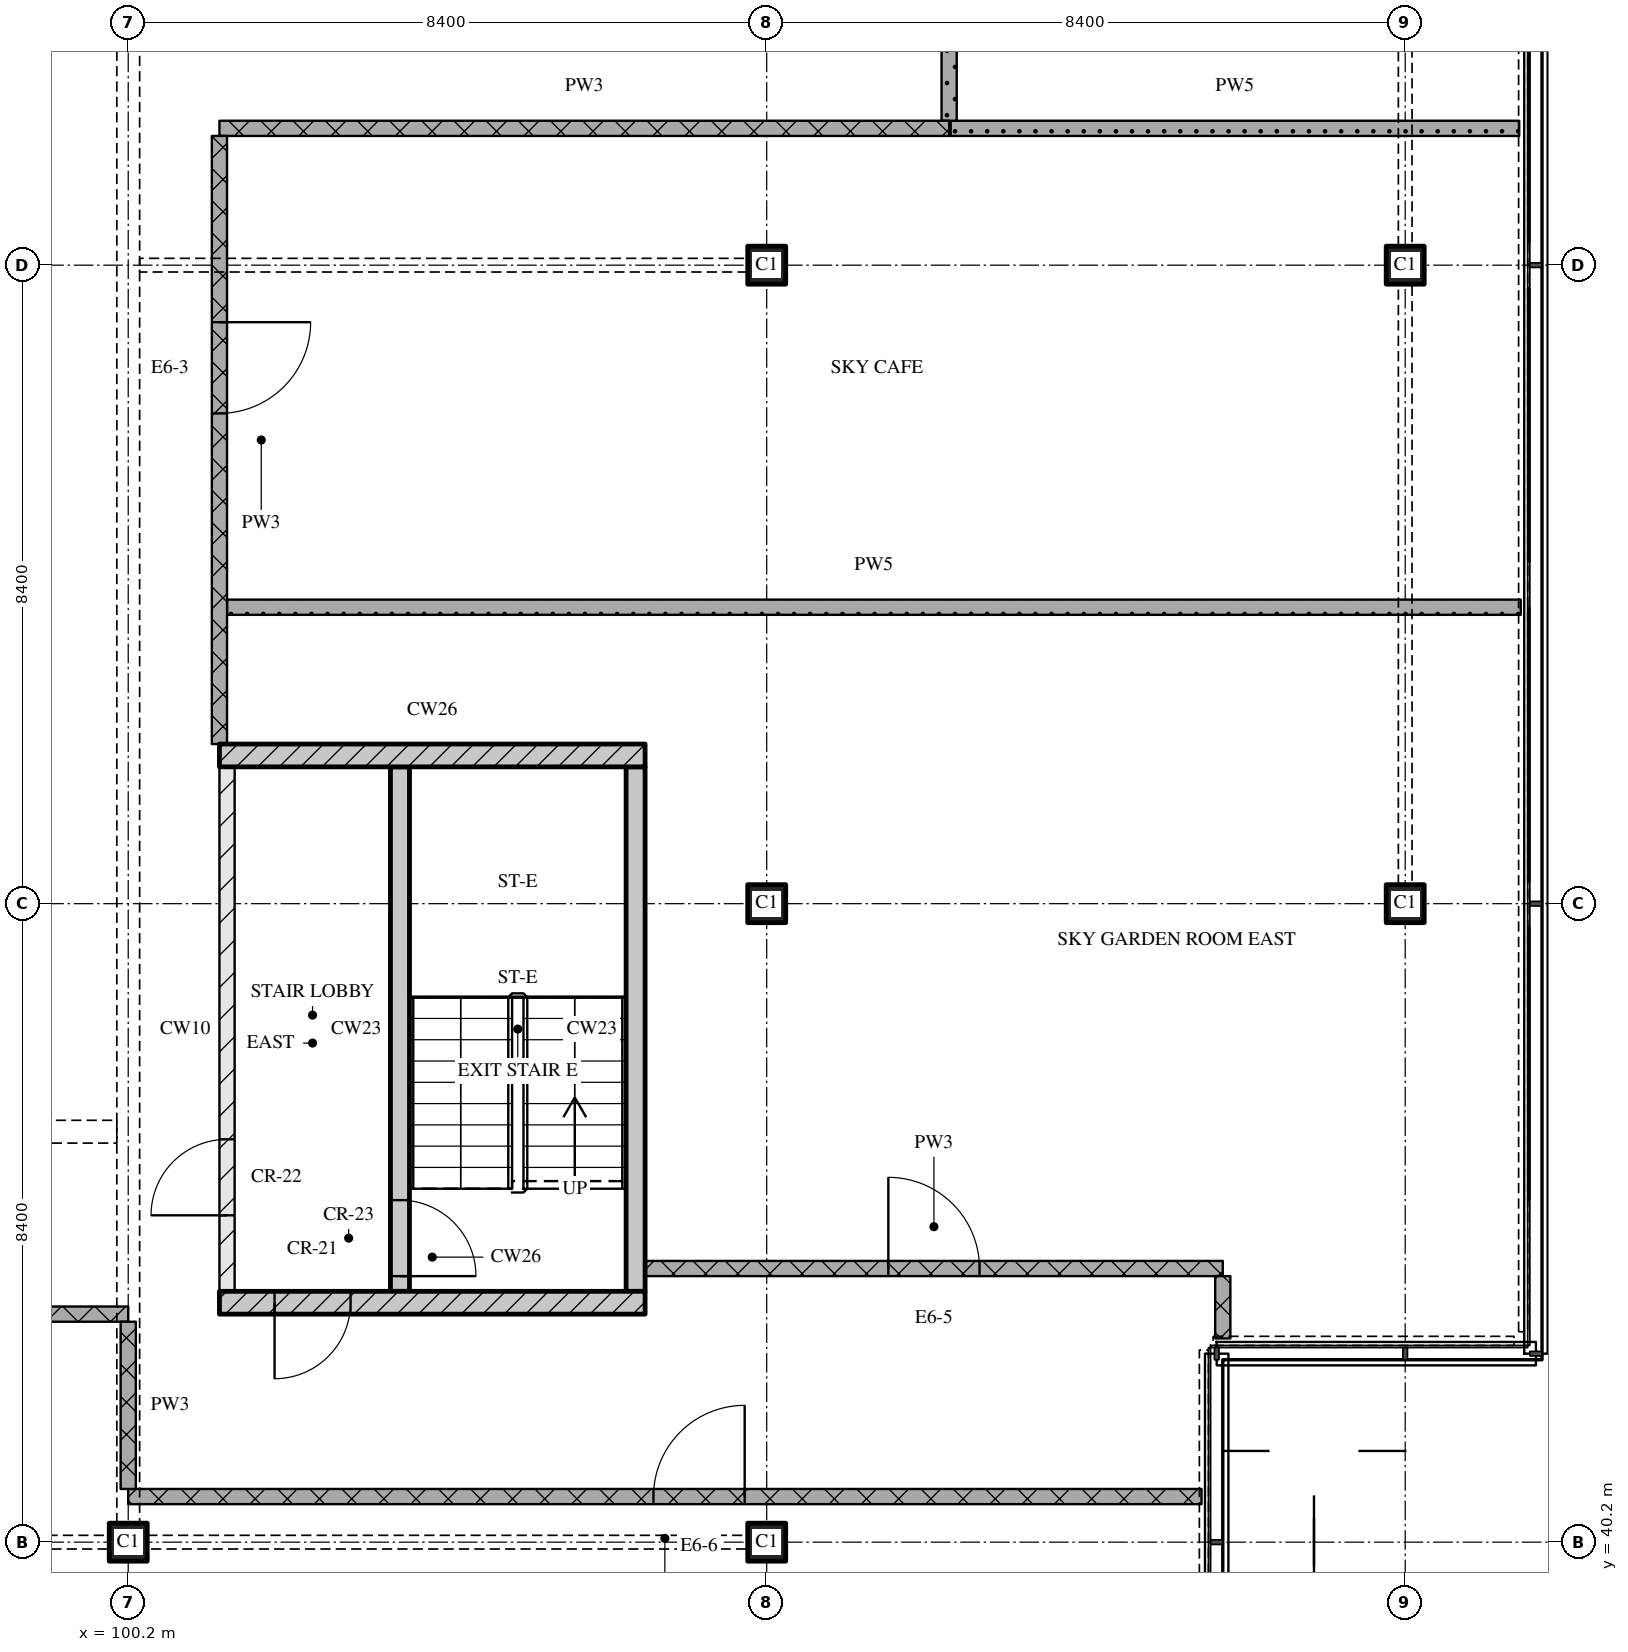
"""IFC4 building model, lengths in metres.
Left out: names, types, materials, properties, quantities, classifications, styles, units other than length and angle.
Written with IfcOpenShell. Run it as: python <this file> out.ifc"""

import sys

from ifc_helpers import new_model, si_unit, direction, frame, frame_2d, origin, origin_2d, place, context, subcontext, project, spatial, rectangle, extrude, element, fill, save


model = new_model("IFC4")
c1 = context("Model", 3, precision=1e-05, world=origin(), true_north=direction((0.0, 1.0)))
c2 = subcontext(c1, "Body", "Model", "MODEL_VIEW")
j1 = project(units=[si_unit("LENGTHUNIT", "METRE"), si_unit("PLANEANGLEUNIT", "RADIAN")], contexts=[c1])
p1 = place(None, origin())
s1 = spatial("IfcSite", under=j1, at=p1, CompositionType="ELEMENT")
p2 = place(p1, origin())
s2 = spatial("IfcBuilding", under=s1, at=p2, CompositionType="ELEMENT")
p3 = place(p2, frame((0.0, 0.0, 299.55)))
s3 = spatial("IfcBuildingStorey", under=s2, at=p3, CompositionType="ELEMENT", Elevation=299.55)
for number, where, z_axis, x_axis in (
    (1, (100.2, 40.2, 0.0), (0.0, 0.0, 1.0), (1.0, 0.0, 0.0)),
    (2, (108.6, 40.2, 0.0), (0.0, 0.0, 1.0), (1.0, 0.0, 0.0)),
    (3, (108.6, 48.6, 0.0), (0.0, 0.0, 1.0), (1.0, 0.0, 0.0)),
    (4, (108.6, 57.0, 0.0), (0.0, 0.0, 1.0), (1.0, 0.0, 0.0)),
    (5, (117.0, 48.6, 0.0), (0.0, 0.0, 1.0), (1.0, 0.0, 0.0)),
    (6, (117.0, 57.0, 0.0), (0.0, 0.0, 1.0), (1.0, 0.0, 0.0)),
):
    element("IfcColumn", number, at=place(p3, frame(where, z_axis=z_axis, x_axis=x_axis)), inside=s3, PredefinedType="COLUMN", context=c2, shape_type="SweptSolid", body=[
        extrude(rectangle(XDim=0.5, YDim=0.5, at=origin_2d()), origin(), (0.0, 0.0, 1.0), 3.6),
    ])
p4 = place(p3, frame((101.4, 43.35, 0.0), z_axis=(0.0, 0.0, 1.0), x_axis=(1.0, 0.0, 0.0)))
e7 = element("IfcWall", 7, at=p4, inside=s3, PredefinedType="SOLIDWALL", context=c2, shape_type="SweptSolid", body=[
    extrude(rectangle(XDim=5.6, YDim=0.3, at=frame_2d((2.8, 0.0))), origin(), (0.0, 0.0, 1.0), 3.32),
])
p5 = place(p4, frame((0.725, 0.0, 0.0)))
e8 = element("IfcOpeningElement", 8, at=p5, cuts=e7, PredefinedType="OPENING", context=c2, shape_type="SweptSolid", body=[
    extrude(rectangle(XDim=1.0, YDim=2.1, at=frame_2d((0.5, 1.05))), frame((0.0, 0.16, 0.0), z_axis=(0.0, -1.0, 0.0), x_axis=(1.0, 0.0, 0.0)), (0.0, 0.0, 1.0), 0.32),
])
p6 = place(p3, frame((101.5, 43.5, 0.0), z_axis=(0.0, 0.0, 1.0), x_axis=(0.0, 1.0, 0.0)))
e9 = element("IfcWall", 9, at=p6, inside=s3, PredefinedType="PARTITIONING", context=c2, shape_type="SweptSolid", body=[
    extrude(rectangle(XDim=6.9, YDim=0.2, at=frame_2d((3.45, 0.0))), origin(), (0.0, 0.0, 1.0), 3.32),
])
p7 = place(p6, frame((1.0, 0.0, 0.0)))
e10 = element("IfcOpeningElement", 10, at=p7, cuts=e9, PredefinedType="OPENING", context=c2, shape_type="SweptSolid", body=[
    extrude(rectangle(XDim=1.0, YDim=2.1, at=frame_2d((0.5, 1.05))), frame((0.0, 0.11, 0.0), z_axis=(0.0, -1.0, 0.0), x_axis=(1.0, 0.0, 0.0)), (0.0, 0.0, 1.0), 0.22),
])
p8 = place(p3, frame((103.775, 43.5, 0.0), z_axis=(0.0, 0.0, 1.0), x_axis=(0.0, 1.0, 0.0)))
e11 = element("IfcWall", 11, at=p8, inside=s3, PredefinedType="SOLIDWALL", context=c2, shape_type="SweptSolid", body=[
    extrude(rectangle(XDim=6.9, YDim=0.25, at=frame_2d((3.45, 0.0))), origin(), (0.0, 0.0, 1.0), 3.32),
])
p9 = place(p8, frame((0.2, 0.0, 0.0)))
e12 = element("IfcOpeningElement", 12, at=p9, cuts=e11, PredefinedType="OPENING", context=c2, shape_type="SweptSolid", body=[
    extrude(rectangle(XDim=1.0, YDim=2.1, at=frame_2d((0.5, 1.05))), frame((0.0, 0.135, 0.0), z_axis=(0.0, -1.0, 0.0), x_axis=(1.0, 0.0, 0.0)), (0.0, 0.0, 1.0), 0.27),
])
p10 = place(p3, frame((106.875, 43.5, 0.0), z_axis=(0.0, 0.0, 1.0), x_axis=(0.0, 1.0, 0.0)))
e13 = element("IfcWall", 13, at=p10, inside=s3, PredefinedType="SOLIDWALL", context=c2, shape_type="SweptSolid", body=[
    extrude(rectangle(XDim=6.9, YDim=0.25, at=frame_2d((3.45, 0.0))), origin(), (0.0, 0.0, 1.0), 3.32),
])
p11 = place(p3, frame((101.4, 50.55, 0.0), z_axis=(0.0, 0.0, 1.0), x_axis=(1.0, 0.0, 0.0)))
e14 = element("IfcWall", 14, at=p11, inside=s3, PredefinedType="SOLIDWALL", context=c2, shape_type="SweptSolid", body=[
    extrude(rectangle(XDim=5.6, YDim=0.3, at=frame_2d((2.8, 0.0))), origin(), (0.0, 0.0, 1.0), 3.32),
])
p12 = place(p3, frame((114.32, 40.8, 0.0), z_axis=(0.0, 0.0, 1.0), x_axis=(-1.0, 0.0, 0.0)))
e15 = element("IfcWall", 15, at=p12, inside=s3, PredefinedType="PARTITIONING", context=c2, shape_type="SweptSolid", body=[
    extrude(rectangle(XDim=14.12, YDim=0.2, at=frame_2d((7.06, 0.0))), origin(), (0.0, 0.0, 1.0), 3.32),
])
p13 = place(p12, frame((6.01, 0.0, 0.0)))
e16 = element("IfcOpeningElement", 16, at=p13, cuts=e15, PredefinedType="OPENING", context=c2, shape_type="SweptSolid", body=[
    extrude(rectangle(XDim=1.2, YDim=2.1, at=frame_2d((0.6, 1.05))), frame((0.0, 0.11, 0.0), z_axis=(0.0, -1.0, 0.0), x_axis=(1.0, 0.0, 0.0)), (0.0, 0.0, 1.0), 0.22),
])
p14 = place(p3, frame((100.2, 43.2, 0.0), z_axis=(0.0, 0.0, 1.0), x_axis=(-1.0, 0.0, 0.0)))
e17 = element("IfcWall", 17, at=p14, inside=s3, PredefinedType="PARTITIONING", context=c2, shape_type="SweptSolid", body=[
    extrude(rectangle(XDim=25.2, YDim=0.2, at=frame_2d((12.6, 0.0))), origin(), (0.0, 0.0, 1.0), 3.32),
])
p15 = place(p14, frame((12.0, 0.0, 0.0)))
e18 = element("IfcOpeningElement", 18, at=p15, cuts=e17, PredefinedType="OPENING", context=c2, shape_type="SweptSolid", body=[
    extrude(rectangle(XDim=1.2, YDim=2.1, at=frame_2d((0.6, 1.05))), frame((0.0, 0.11, 0.0), z_axis=(0.0, -1.0, 0.0), x_axis=(1.0, 0.0, 0.0)), (0.0, 0.0, 1.0), 0.22),
])
p16 = place(p3, frame((107.0, 43.8, 0.0), z_axis=(0.0, 0.0, 1.0), x_axis=(1.0, 0.0, 0.0)))
e19 = element("IfcWall", 19, at=p16, inside=s3, PredefinedType="PARTITIONING", context=c2, shape_type="SweptSolid", body=[
    extrude(rectangle(XDim=7.6, YDim=0.2, at=frame_2d((3.8, 0.0))), origin(), (0.0, 0.0, 1.0), 3.32),
])
p17 = place(p16, frame((3.2, 0.0, 0.0)))
e20 = element("IfcOpeningElement", 20, at=p17, cuts=e19, PredefinedType="OPENING", context=c2, shape_type="SweptSolid", body=[
    extrude(rectangle(XDim=1.2, YDim=2.1, at=frame_2d((0.6, 1.05))), frame((0.0, 0.11, 0.0), z_axis=(0.0, -1.0, 0.0), x_axis=(1.0, 0.0, 0.0)), (0.0, 0.0, 1.0), 0.22),
])
p18 = place(p3, frame((101.5, 52.5, 0.0), z_axis=(0.0, 0.0, 1.0), x_axis=(1.0, 0.0, 0.0)))
e21 = element("IfcWall", 21, at=p18, inside=s3, PredefinedType="PARTITIONING", context=c2, shape_type="SweptSolid", body=[
    extrude(rectangle(XDim=17.02, YDim=0.2, at=frame_2d((8.51, 0.0))), origin(), (0.0, 0.0, 1.0), 3.32),
])
p19 = place(p3, frame((101.4, 58.8, 0.0), z_axis=(0.0, 0.0, 1.0), x_axis=(1.0, 0.0, 0.0)))
e22 = element("IfcWall", 22, at=p19, inside=s3, PredefinedType="PARTITIONING", context=c2, shape_type="SweptSolid", body=[
    extrude(rectangle(XDim=9.6, YDim=0.2, at=frame_2d((4.8, 0.0))), origin(), (0.0, 0.0, 1.0), 3.32),
])
p20 = place(p3, frame((111.02, 58.8, 0.0), z_axis=(0.0, 0.0, 1.0), x_axis=(1.0, 0.0, 0.0)))
e23 = element("IfcWall", 23, at=p20, inside=s3, PredefinedType="PARTITIONING", context=c2, shape_type="SweptSolid", body=[
    extrude(rectangle(XDim=7.48, YDim=0.2, at=frame_2d((3.74, 0.0))), origin(), (0.0, 0.0, 1.0), 3.32),
])
p21 = place(p3, frame((100.2, 43.1, 0.0), z_axis=(0.0, 0.0, 1.0), x_axis=(0.0, -1.0, 0.0)))
e24 = element("IfcWall", 24, at=p21, inside=s3, PredefinedType="PARTITIONING", context=c2, shape_type="SweptSolid", body=[
    extrude(rectangle(XDim=2.2, YDim=0.2, at=frame_2d((1.1, 0.0))), origin(), (0.0, 0.0, 1.0), 2.53),
])
p22 = place(p3, frame((101.4, 58.7, 0.0), z_axis=(0.0, 0.0, 1.0), x_axis=(0.0, -1.0, 0.0)))
e25 = element("IfcWall", 25, at=p22, inside=s3, PredefinedType="PARTITIONING", context=c2, shape_type="SweptSolid", body=[
    extrude(rectangle(XDim=8.0, YDim=0.2, at=frame_2d((4.0, 0.0))), origin(), (0.0, 0.0, 1.0), 3.32),
])
p23 = place(p22, frame((2.45, 0.0, 0.0)))
e26 = element("IfcOpeningElement", 26, at=p23, cuts=e25, PredefinedType="OPENING", context=c2, shape_type="SweptSolid", body=[
    extrude(rectangle(XDim=1.2, YDim=2.1, at=frame_2d((0.6, 1.05))), frame((0.0, 0.11, 0.0), z_axis=(0.0, -1.0, 0.0), x_axis=(1.0, 0.0, 0.0)), (0.0, 0.0, 1.0), 0.22),
])
p24 = place(p3, frame((111.0, 61.1, 0.0), z_axis=(0.0, 0.0, 1.0), x_axis=(0.0, -1.0, 0.0)))
e27 = element("IfcWall", 27, at=p24, inside=s3, PredefinedType="PARTITIONING", context=c2, shape_type="SweptSolid", body=[
    extrude(rectangle(XDim=2.2, YDim=0.2, at=frame_2d((1.1, 0.0))), origin(), (0.0, 0.0, 1.0), 3.32),
])
p25 = place(p3, frame((114.6, 43.7, 0.0), z_axis=(0.0, 0.0, 1.0), x_axis=(0.0, -1.0, 0.0)))
e28 = element("IfcWall", 28, at=p25, inside=s3, PredefinedType="PARTITIONING", context=c2, shape_type="SweptSolid", body=[
    extrude(rectangle(XDim=0.82, YDim=0.2, at=frame_2d((0.41, 0.0))), origin(), (0.0, 0.0, 1.0), 3.32),
])
p26 = place(p5, origin())
e29 = element("IfcDoor", 29, at=p26, inside=s3, OperationType="SINGLE_SWING_RIGHT", PredefinedType="DOOR", context=c2, shape_type="SweptSolid", body=[
    extrude(rectangle(XDim=1.0, YDim=2.1, at=frame_2d((0.5, 1.05))), frame((0.0, 0.025, 0.0), z_axis=(0.0, -1.0, 0.0), x_axis=(1.0, 0.0, 0.0)), (0.0, 0.0, 1.0), 0.05),
])
fill(e8, e29)
p27 = place(p9, origin())
e30 = element("IfcDoor", 30, at=p27, inside=s3, OperationType="SINGLE_SWING_RIGHT", PredefinedType="DOOR", context=c2, shape_type="SweptSolid", body=[
    extrude(rectangle(XDim=1.0, YDim=2.1, at=frame_2d((0.5, 1.05))), frame((0.0, 0.025, 0.0), z_axis=(0.0, -1.0, 0.0), x_axis=(1.0, 0.0, 0.0)), (0.0, 0.0, 1.0), 0.05),
])
fill(e12, e30)
p28 = place(p7, origin())
e31 = element("IfcDoor", 31, at=p28, inside=s3, OperationType="SINGLE_SWING_LEFT", PredefinedType="DOOR", context=c2, shape_type="SweptSolid", body=[
    extrude(rectangle(XDim=1.0, YDim=2.1, at=frame_2d((0.5, 1.05))), frame((0.0, 0.025, 0.0), z_axis=(0.0, -1.0, 0.0), x_axis=(1.0, 0.0, 0.0)), (0.0, 0.0, 1.0), 0.05),
])
fill(e10, e31)
p29 = place(p13, origin())
e32 = element("IfcDoor", 32, at=p29, inside=s3, OperationType="SINGLE_SWING_RIGHT", PredefinedType="DOOR", context=c2, shape_type="SweptSolid", body=[
    extrude(rectangle(XDim=1.2, YDim=2.1, at=frame_2d((0.6, 1.05))), frame((0.0, 0.025, 0.0), z_axis=(0.0, -1.0, 0.0), x_axis=(1.0, 0.0, 0.0)), (0.0, 0.0, 1.0), 0.05),
])
fill(e16, e32)
p30 = place(p17, origin())
e33 = element("IfcDoor", 33, at=p30, inside=s3, OperationType="SINGLE_SWING_LEFT", PredefinedType="DOOR", context=c2, shape_type="SweptSolid", body=[
    extrude(rectangle(XDim=1.2, YDim=2.1, at=frame_2d((0.6, 1.05))), frame((0.0, 0.025, 0.0), z_axis=(0.0, -1.0, 0.0), x_axis=(1.0, 0.0, 0.0)), (0.0, 0.0, 1.0), 0.05),
])
fill(e20, e33)
p31 = place(p23, origin())
e34 = element("IfcDoor", 34, at=p31, inside=s3, OperationType="SINGLE_SWING_LEFT", PredefinedType="DOOR", context=c2, shape_type="SweptSolid", body=[
    extrude(rectangle(XDim=1.2, YDim=2.1, at=frame_2d((0.6, 1.05))), frame((0.0, 0.025, 0.0), z_axis=(0.0, -1.0, 0.0), x_axis=(1.0, 0.0, 0.0)), (0.0, 0.0, 1.0), 0.05),
])
fill(e26, e34)
save(model, sys.argv[1])
